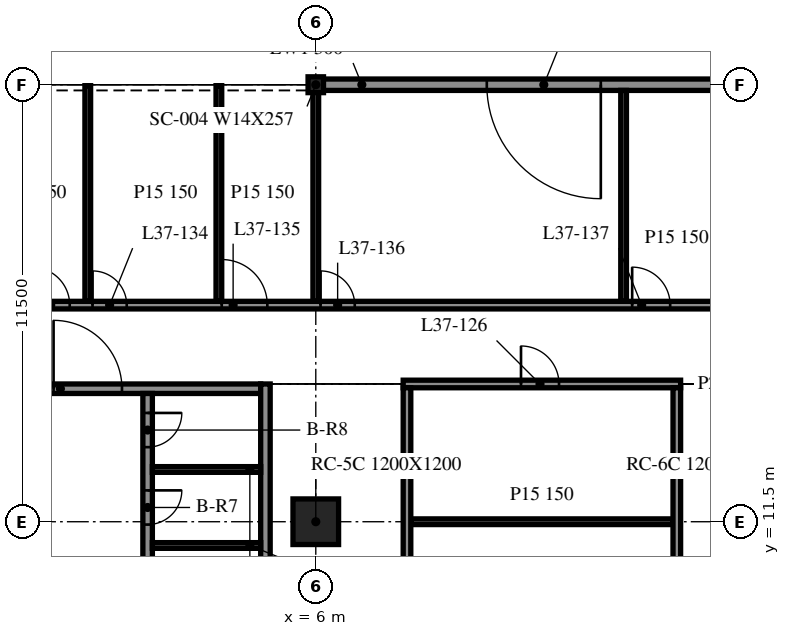
"""IFC4 building model, lengths in metres.
Left out: names, types, materials, properties, quantities, classifications, styles, units other than length and angle.
Written with IfcOpenShell. Run it as: python <this file> out.ifc"""

import sys

from ifc_helpers import new_model, si_unit, direction, frame, frame_2d, origin, origin_2d, place, context, subcontext, project, spatial, rectangle, i_section, extrude, element, fill, save


model = new_model("IFC4")
c1 = context("Model", 3, precision=1e-05, world=origin(), true_north=direction((0.0, 1.0)))
c2 = subcontext(c1, "Body", "Model", "MODEL_VIEW")
j1 = project(units=[si_unit("LENGTHUNIT", "METRE"), si_unit("PLANEANGLEUNIT", "RADIAN")], contexts=[c1])
p1 = place(None, origin())
s1 = spatial("IfcSite", under=j1, at=p1, CompositionType="ELEMENT")
p2 = place(p1, origin())
s2 = spatial("IfcBuilding", under=s1, at=p2, CompositionType="ELEMENT")
p3 = place(p2, frame((0.0, 0.0, 159.2)))
s3 = spatial("IfcBuildingStorey", under=s2, at=p3, CompositionType="ELEMENT", Elevation=159.2)
p4 = place(p3, frame((6.0, 11.5, -0.34), z_axis=(0.0, 0.0, 1.0), x_axis=(1.0, 0.0, 0.0)))
e1 = element("IfcColumn", 1, at=p4, inside=s3, PredefinedType="COLUMN", context=c2, shape_type="SweptSolid", body=[
    extrude(rectangle(XDim=1.2, YDim=1.2, at=origin_2d()), origin(), (0.0, 0.0, 1.0), 3.8),
])
p5 = place(p3, frame((6.0, 23.0, -0.34), z_axis=(0.0, 0.0, 1.0), x_axis=(1.0, 0.0, 0.0)))
e2 = element("IfcColumn", 2, at=p5, inside=s3, PredefinedType="COLUMN", context=c2, shape_type="SweptSolid", body=[
    extrude(i_section(OverallWidth=0.406, OverallDepth=0.417, WebThickness=0.03, FlangeThickness=0.048, at=origin_2d()), origin(), (0.0, 0.0, 1.0), 3.8),
])
p6 = place(p3, frame((17.985, 23.0, 0.0), z_axis=(0.0, 0.0, 1.0), x_axis=(-1.0, 0.0, 0.0)))
e3 = element("IfcWall", 3, at=p6, inside=s3, PredefinedType="NOTDEFINED", context=c2, shape_type="SweptSolid", body=[
    extrude(rectangle(XDim=11.97, YDim=0.3, at=frame_2d((5.985, 0.0))), origin(), (0.0, 0.0, 1.0), 2.782),
])
p7 = place(p6, frame((4.485, 0.0, 0.0)))
e4 = element("IfcOpeningElement", 4, at=p7, cuts=e3, PredefinedType="OPENING", context=c2, shape_type="SweptSolid", body=[
    extrude(rectangle(XDim=3.0, YDim=2.4, at=frame_2d((1.5, 1.2))), frame((0.0, 0.16, 0.0), z_axis=(0.0, -1.0, 0.0), x_axis=(1.0, 0.0, 0.0)), (0.0, 0.0, 1.0), 0.32),
])
p8 = place(p3, frame((4.675, -9.125, 0.0), z_axis=(0.0, 0.0, 1.0), x_axis=(0.0, 1.0, 0.0)))
e5 = element("IfcWall", 5, at=p8, inside=s3, PredefinedType="SOLIDWALL", context=c2, shape_type="SweptSolid", body=[
    extrude(rectangle(XDim=24.25, YDim=0.25, at=frame_2d((12.125, 0.0))), origin(), (0.0, 0.0, 1.0), 3.46),
])
p9 = place(p3, frame((-4.55, 15.0, 0.0), z_axis=(0.0, 0.0, 1.0), x_axis=(1.0, 0.0, 0.0)))
e6 = element("IfcWall", 6, at=p9, inside=s3, PredefinedType="SOLIDWALL", context=c2, shape_type="SweptSolid", body=[
    extrude(rectangle(XDim=9.1, YDim=0.25, at=frame_2d((4.55, 0.0))), origin(), (0.0, 0.0, 1.0), 3.46),
])
p10 = place(p9, frame((3.65, 0.0, 0.0)))
e7 = element("IfcOpeningElement", 7, at=p10, cuts=e6, PredefinedType="OPENING", context=c2, shape_type="SweptSolid", body=[
    extrude(rectangle(XDim=1.8, YDim=2.1, at=frame_2d((0.9, 1.05))), frame((0.0, 0.135, 0.0), z_axis=(0.0, -1.0, 0.0), x_axis=(1.0, 0.0, 0.0)), (0.0, 0.0, 1.0), 0.27),
])
p11 = place(p3, frame((1.575, 14.875, 0.0), z_axis=(0.0, 0.0, 1.0), x_axis=(0.0, -1.0, 0.0)))
e8 = element("IfcWall", 8, at=p11, inside=s3, PredefinedType="SOLIDWALL", context=c2, shape_type="SweptSolid", body=[
    extrude(rectangle(XDim=17.5, YDim=0.25, at=frame_2d((8.75, 0.0))), origin(), (0.0, 0.0, 1.0), 3.46),
])
p12 = place(p11, frame((15.45, 0.0, 0.0)))
e9 = element("IfcOpeningElement", 9, at=p12, cuts=e8, PredefinedType="OPENING", context=c2, shape_type="SweptSolid", body=[
    extrude(rectangle(XDim=1.1, YDim=2.1, at=frame_2d((0.55, 1.05))), frame((0.0, 0.135, 0.0), z_axis=(0.0, -1.0, 0.0), x_axis=(1.0, 0.0, 0.0)), (0.0, 0.0, 1.0), 0.27),
])
p13 = place(p11, frame((12.7, 0.0, 0.0)))
e10 = element("IfcOpeningElement", 10, at=p13, cuts=e8, PredefinedType="OPENING", context=c2, shape_type="SweptSolid", body=[
    extrude(rectangle(XDim=1.1, YDim=2.1, at=frame_2d((0.55, 1.05))), frame((0.0, 0.135, 0.0), z_axis=(0.0, -1.0, 0.0), x_axis=(1.0, 0.0, 0.0)), (0.0, 0.0, 1.0), 0.27),
])
p14 = place(p11, frame((9.95, 0.0, 0.0)))
e11 = element("IfcOpeningElement", 11, at=p14, cuts=e8, PredefinedType="OPENING", context=c2, shape_type="SweptSolid", body=[
    extrude(rectangle(XDim=1.1, YDim=2.1, at=frame_2d((0.55, 1.05))), frame((0.0, 0.135, 0.0), z_axis=(0.0, -1.0, 0.0), x_axis=(1.0, 0.0, 0.0)), (0.0, 0.0, 1.0), 0.27),
])
p15 = place(p11, frame((7.2, 0.0, 0.0)))
e12 = element("IfcOpeningElement", 12, at=p15, cuts=e8, PredefinedType="OPENING", context=c2, shape_type="SweptSolid", body=[
    extrude(rectangle(XDim=1.1, YDim=2.1, at=frame_2d((0.55, 1.05))), frame((0.0, 0.135, 0.0), z_axis=(0.0, -1.0, 0.0), x_axis=(1.0, 0.0, 0.0)), (0.0, 0.0, 1.0), 0.27),
])
p16 = place(p11, frame((4.587, 0.0, 0.0)))
e13 = element("IfcOpeningElement", 13, at=p16, cuts=e8, PredefinedType="OPENING", context=c2, shape_type="SweptSolid", body=[
    extrude(rectangle(XDim=0.9, YDim=2.1, at=frame_2d((0.45, 1.05))), frame((0.0, 0.135, 0.0), z_axis=(0.0, -1.0, 0.0), x_axis=(1.0, 0.0, 0.0)), (0.0, 0.0, 1.0), 0.27),
])
p17 = place(p11, frame((2.55, 0.0, 0.0)))
e14 = element("IfcOpeningElement", 14, at=p17, cuts=e8, PredefinedType="OPENING", context=c2, shape_type="SweptSolid", body=[
    extrude(rectangle(XDim=0.9, YDim=2.1, at=frame_2d((0.45, 1.05))), frame((0.0, 0.135, 0.0), z_axis=(0.0, -1.0, 0.0), x_axis=(1.0, 0.0, 0.0)), (0.0, 0.0, 1.0), 0.27),
])
p18 = place(p11, frame((0.512, 0.0, 0.0)))
e15 = element("IfcOpeningElement", 15, at=p18, cuts=e8, PredefinedType="OPENING", context=c2, shape_type="SweptSolid", body=[
    extrude(rectangle(XDim=0.9, YDim=2.1, at=frame_2d((0.45, 1.05))), frame((0.0, 0.135, 0.0), z_axis=(0.0, -1.0, 0.0), x_axis=(1.0, 0.0, 0.0)), (0.0, 0.0, 1.0), 0.27),
])
for number, where, z_axis, x_axis in (
    (16, (1.7, 10.875, 0.0), (0.0, 0.0, 1.0), (1.0, 0.0, 0.0)),
    (17, (1.7, 12.875, 0.0), (0.0, 0.0, 1.0), (1.0, 0.0, 0.0)),
):
    element("IfcWall", number, at=place(p3, frame(where, z_axis=z_axis, x_axis=x_axis)), inside=s3, PredefinedType="PARTITIONING", context=c2, shape_type="SweptSolid", body=[
        extrude(rectangle(XDim=2.85, YDim=0.15, at=frame_2d((1.425, 0.0))), origin(), (0.0, 0.0, 1.0), 3.46),
    ])
p19 = place(p3, frame((8.5, 11.5, 0.0), z_axis=(0.0, 0.0, 1.0), x_axis=(1.0, 0.0, 0.0)))
e18 = element("IfcWall", 18, at=p19, inside=s3, PredefinedType="PARTITIONING", context=c2, shape_type="SweptSolid", body=[
    extrude(rectangle(XDim=6.9, YDim=0.15, at=frame_2d((3.45, 0.0))), origin(), (0.0, 0.0, 1.0), 3.46),
])
p20 = place(p3, frame((8.3, 15.125, 0.0), z_axis=(0.0, 0.0, 1.0), x_axis=(1.0, 0.0, 0.0)))
e19 = element("IfcWall", 19, at=p20, inside=s3, PredefinedType="PARTITIONING", context=c2, shape_type="SweptSolid", body=[
    extrude(rectangle(XDim=7.3, YDim=0.2, at=frame_2d((3.65, 0.0))), origin(), (0.0, 0.0, 1.0), 3.46),
])
p21 = place(p20, frame((3.1, 0.0, 0.0)))
e20 = element("IfcOpeningElement", 20, at=p21, cuts=e19, PredefinedType="OPENING", context=c2, shape_type="SweptSolid", body=[
    extrude(rectangle(XDim=1.0, YDim=2.1, at=frame_2d((0.5, 1.05))), frame((0.0, 0.11, 0.0), z_axis=(0.0, -1.0, 0.0), x_axis=(1.0, 0.0, 0.0)), (0.0, 0.0, 1.0), 0.22),
])
p22 = place(p3, frame((-47.975, 17.2, 0.0), z_axis=(0.0, 0.0, 1.0), x_axis=(1.0, 0.0, 0.0)))
e21 = element("IfcWall", 21, at=p22, inside=s3, PredefinedType="PARTITIONING", context=c2, shape_type="SweptSolid", body=[
    extrude(rectangle(XDim=95.95, YDim=0.2, at=frame_2d((47.975, 0.0))), origin(), (0.0, 0.0, 1.0), 3.46),
])
p23 = place(p22, frame((4.5, 0.0, 0.0)))
e22 = element("IfcOpeningElement", 22, at=p23, cuts=e21, PredefinedType="OPENING", context=c2, shape_type="SweptSolid", body=[
    extrude(rectangle(XDim=1.0, YDim=2.1, at=frame_2d((0.5, 1.05))), frame((0.0, 0.11, 0.0), z_axis=(0.0, -1.0, 0.0), x_axis=(1.0, 0.0, 0.0)), (0.0, 0.0, 1.0), 0.22),
])
p24 = place(p22, frame((10.5, 0.0, 0.0)))
e23 = element("IfcOpeningElement", 23, at=p24, cuts=e21, PredefinedType="OPENING", context=c2, shape_type="SweptSolid", body=[
    extrude(rectangle(XDim=1.0, YDim=2.1, at=frame_2d((0.5, 1.05))), frame((0.0, 0.11, 0.0), z_axis=(0.0, -1.0, 0.0), x_axis=(1.0, 0.0, 0.0)), (0.0, 0.0, 1.0), 0.22),
])
p25 = place(p22, frame((22.7, 0.0, 0.0)))
e24 = element("IfcOpeningElement", 24, at=p25, cuts=e21, PredefinedType="OPENING", context=c2, shape_type="SweptSolid", body=[
    extrude(rectangle(XDim=0.9, YDim=2.1, at=frame_2d((0.45, 1.05))), frame((0.0, 0.11, 0.0), z_axis=(0.0, -1.0, 0.0), x_axis=(1.0, 0.0, 0.0)), (0.0, 0.0, 1.0), 0.22),
])
p26 = place(p22, frame((25.7, 0.0, 0.0)))
e25 = element("IfcOpeningElement", 25, at=p26, cuts=e21, PredefinedType="OPENING", context=c2, shape_type="SweptSolid", body=[
    extrude(rectangle(XDim=1.2, YDim=2.1, at=frame_2d((0.6, 1.05))), frame((0.0, 0.11, 0.0), z_axis=(0.0, -1.0, 0.0), x_axis=(1.0, 0.0, 0.0)), (0.0, 0.0, 1.0), 0.22),
])
p27 = place(p22, frame((28.7, 0.0, 0.0)))
e26 = element("IfcOpeningElement", 26, at=p27, cuts=e21, PredefinedType="OPENING", context=c2, shape_type="SweptSolid", body=[
    extrude(rectangle(XDim=0.9, YDim=2.1, at=frame_2d((0.45, 1.05))), frame((0.0, 0.11, 0.0), z_axis=(0.0, -1.0, 0.0), x_axis=(1.0, 0.0, 0.0)), (0.0, 0.0, 1.0), 0.22),
])
p28 = place(p22, frame((36.7, 0.0, 0.0)))
e27 = element("IfcOpeningElement", 27, at=p28, cuts=e21, PredefinedType="OPENING", context=c2, shape_type="SweptSolid", body=[
    extrude(rectangle(XDim=1.0, YDim=2.1, at=frame_2d((0.5, 1.05))), frame((0.0, 0.11, 0.0), z_axis=(0.0, -1.0, 0.0), x_axis=(1.0, 0.0, 0.0)), (0.0, 0.0, 1.0), 0.22),
])
p29 = place(p22, frame((46.5, 0.0, 0.0)))
e28 = element("IfcOpeningElement", 28, at=p29, cuts=e21, PredefinedType="OPENING", context=c2, shape_type="SweptSolid", body=[
    extrude(rectangle(XDim=1.0, YDim=2.1, at=frame_2d((0.5, 1.05))), frame((0.0, 0.11, 0.0), z_axis=(0.0, -1.0, 0.0), x_axis=(1.0, 0.0, 0.0)), (0.0, 0.0, 1.0), 0.22),
])
p30 = place(p22, frame((48.1, 0.0, 0.0)))
e29 = element("IfcOpeningElement", 29, at=p30, cuts=e21, PredefinedType="OPENING", context=c2, shape_type="SweptSolid", body=[
    extrude(rectangle(XDim=0.9, YDim=2.1, at=frame_2d((0.45, 1.05))), frame((0.0, 0.11, 0.0), z_axis=(0.0, -1.0, 0.0), x_axis=(1.0, 0.0, 0.0)), (0.0, 0.0, 1.0), 0.22),
])
p31 = place(p22, frame((51.5, 0.0, 0.0)))
e30 = element("IfcOpeningElement", 30, at=p31, cuts=e21, PredefinedType="OPENING", context=c2, shape_type="SweptSolid", body=[
    extrude(rectangle(XDim=1.2, YDim=2.1, at=frame_2d((0.6, 1.05))), frame((0.0, 0.11, 0.0), z_axis=(0.0, -1.0, 0.0), x_axis=(1.0, 0.0, 0.0)), (0.0, 0.0, 1.0), 0.22),
])
p32 = place(p22, frame((54.1, 0.0, 0.0)))
e31 = element("IfcOpeningElement", 31, at=p32, cuts=e21, PredefinedType="OPENING", context=c2, shape_type="SweptSolid", body=[
    extrude(rectangle(XDim=0.9, YDim=2.1, at=frame_2d((0.45, 1.05))), frame((0.0, 0.11, 0.0), z_axis=(0.0, -1.0, 0.0), x_axis=(1.0, 0.0, 0.0)), (0.0, 0.0, 1.0), 0.22),
])
p33 = place(p22, frame((62.3, 0.0, 0.0)))
e32 = element("IfcOpeningElement", 32, at=p33, cuts=e21, PredefinedType="OPENING", context=c2, shape_type="SweptSolid", body=[
    extrude(rectangle(XDim=1.0, YDim=2.1, at=frame_2d((0.5, 1.05))), frame((0.0, 0.11, 0.0), z_axis=(0.0, -1.0, 0.0), x_axis=(1.0, 0.0, 0.0)), (0.0, 0.0, 1.0), 0.22),
])
p34 = place(p22, frame((74.3, 0.0, 0.0)))
e33 = element("IfcOpeningElement", 33, at=p34, cuts=e21, PredefinedType="OPENING", context=c2, shape_type="SweptSolid", body=[
    extrude(rectangle(XDim=1.0, YDim=2.1, at=frame_2d((0.5, 1.05))), frame((0.0, 0.11, 0.0), z_axis=(0.0, -1.0, 0.0), x_axis=(1.0, 0.0, 0.0)), (0.0, 0.0, 1.0), 0.22),
])
p35 = place(p22, frame((78.1, 0.0, 0.0)))
e34 = element("IfcOpeningElement", 34, at=p35, cuts=e21, PredefinedType="OPENING", context=c2, shape_type="SweptSolid", body=[
    extrude(rectangle(XDim=0.9, YDim=2.1, at=frame_2d((0.45, 1.05))), frame((0.0, 0.11, 0.0), z_axis=(0.0, -1.0, 0.0), x_axis=(1.0, 0.0, 0.0)), (0.0, 0.0, 1.0), 0.22),
])
p36 = place(p22, frame((84.1, 0.0, 0.0)))
e35 = element("IfcOpeningElement", 35, at=p36, cuts=e21, PredefinedType="OPENING", context=c2, shape_type="SweptSolid", body=[
    extrude(rectangle(XDim=1.2, YDim=2.1, at=frame_2d((0.6, 1.05))), frame((0.0, 0.11, 0.0), z_axis=(0.0, -1.0, 0.0), x_axis=(1.0, 0.0, 0.0)), (0.0, 0.0, 1.0), 0.22),
])
for number, where, z_axis, x_axis in (
    (36, (0.0, 17.3, 0.0), (0.0, 0.0, 1.0), (0.0, 1.0, 0.0)),
    (37, (3.45, 17.3, 0.0), (0.0, 0.0, 1.0), (0.0, 1.0, 0.0)),
    (38, (6.0, 17.3, 0.0), (0.0, 0.0, 1.0), (0.0, 1.0, 0.0)),
):
    element("IfcWall", number, at=place(p3, frame(where, z_axis=z_axis, x_axis=x_axis)), inside=s3, PredefinedType="PARTITIONING", context=c2, shape_type="SweptSolid", body=[
        extrude(rectangle(XDim=5.675, YDim=0.15, at=frame_2d((2.837, 0.0))), origin(), (0.0, 0.0, 1.0), 3.46),
    ])
p37 = place(p3, frame((8.4, -9.025, 0.0), z_axis=(0.0, 0.0, 1.0), x_axis=(0.0, 1.0, 0.0)))
e39 = element("IfcWall", 39, at=p37, inside=s3, PredefinedType="PARTITIONING", context=c2, shape_type="SweptSolid", body=[
    extrude(rectangle(XDim=24.05, YDim=0.2, at=frame_2d((12.025, 0.0))), origin(), (0.0, 0.0, 1.0), 3.46),
])
p38 = place(p37, frame((11.5, 0.0, 0.0)))
e40 = element("IfcOpeningElement", 40, at=p38, cuts=e39, PredefinedType="OPENING", context=c2, shape_type="SweptSolid", body=[
    extrude(rectangle(XDim=0.9, YDim=2.1, at=frame_2d((0.45, 1.05))), frame((0.0, 0.11, 0.0), z_axis=(0.0, -1.0, 0.0), x_axis=(1.0, 0.0, 0.0)), (0.0, 0.0, 1.0), 0.22),
])
p39 = place(p3, frame((14.1, 17.3, 0.0), z_axis=(0.0, 0.0, 1.0), x_axis=(0.0, 1.0, 0.0)))
e41 = element("IfcWall", 41, at=p39, inside=s3, PredefinedType="PARTITIONING", context=c2, shape_type="SweptSolid", body=[
    extrude(rectangle(XDim=5.55, YDim=0.15, at=frame_2d((2.775, 0.0))), origin(), (0.0, 0.0, 1.0), 3.46),
])
p40 = place(p3, frame((15.5, -9.025, 0.0), z_axis=(0.0, 0.0, 1.0), x_axis=(0.0, 1.0, 0.0)))
e42 = element("IfcWall", 42, at=p40, inside=s3, PredefinedType="PARTITIONING", context=c2, shape_type="SweptSolid", body=[
    extrude(rectangle(XDim=24.05, YDim=0.2, at=frame_2d((12.025, 0.0))), origin(), (0.0, 0.0, 1.0), 3.46),
])
p41 = place(p7, origin())
e43 = element("IfcDoor", 43, at=p41, inside=s3, OperationType="SINGLE_SWING_LEFT", PredefinedType="DOOR", context=c2, shape_type="SweptSolid", body=[
    extrude(rectangle(XDim=3.0, YDim=2.4, at=frame_2d((1.5, 1.2))), frame((0.0, 0.025, 0.0), z_axis=(0.0, -1.0, 0.0), x_axis=(1.0, 0.0, 0.0)), (0.0, 0.0, 1.0), 0.05),
])
fill(e4, e43)
p42 = place(p10, origin())
e44 = element("IfcDoor", 44, at=p42, inside=s3, OperationType="DOUBLE_DOOR_SINGLE_SWING", PredefinedType="DOOR", context=c2, shape_type="SweptSolid", body=[
    extrude(rectangle(XDim=1.8, YDim=2.1, at=frame_2d((0.9, 1.05))), frame((0.0, 0.025, 0.0), z_axis=(0.0, -1.0, 0.0), x_axis=(1.0, 0.0, 0.0)), (0.0, 0.0, 1.0), 0.05),
])
fill(e7, e44)
p43 = place(p17, origin())
e45 = element("IfcDoor", 45, at=p43, inside=s3, OperationType="SINGLE_SWING_LEFT", PredefinedType="DOOR", context=c2, shape_type="SweptSolid", body=[
    extrude(rectangle(XDim=0.9, YDim=2.1, at=frame_2d((0.45, 1.05))), frame((0.0, 0.025, 0.0), z_axis=(0.0, -1.0, 0.0), x_axis=(1.0, 0.0, 0.0)), (0.0, 0.0, 1.0), 0.05),
])
fill(e14, e45)
p44 = place(p18, origin())
e46 = element("IfcDoor", 46, at=p44, inside=s3, OperationType="SINGLE_SWING_RIGHT", PredefinedType="DOOR", context=c2, shape_type="SweptSolid", body=[
    extrude(rectangle(XDim=0.9, YDim=2.1, at=frame_2d((0.45, 1.05))), frame((0.0, 0.025, 0.0), z_axis=(0.0, -1.0, 0.0), x_axis=(1.0, 0.0, 0.0)), (0.0, 0.0, 1.0), 0.05),
])
fill(e15, e46)
p45 = place(p21, origin())
e47 = element("IfcDoor", 47, at=p45, inside=s3, OperationType="SINGLE_SWING_RIGHT", PredefinedType="DOOR", context=c2, shape_type="SweptSolid", body=[
    extrude(rectangle(XDim=1.0, YDim=2.1, at=frame_2d((0.5, 1.05))), frame((0.0, 0.025, 0.0), z_axis=(0.0, -1.0, 0.0), x_axis=(1.0, 0.0, 0.0)), (0.0, 0.0, 1.0), 0.05),
])
fill(e20, e47)
p46 = place(p29, origin())
e48 = element("IfcDoor", 48, at=p46, inside=s3, OperationType="SINGLE_SWING_LEFT", PredefinedType="DOOR", context=c2, shape_type="SweptSolid", body=[
    extrude(rectangle(XDim=1.0, YDim=2.1, at=frame_2d((0.5, 1.05))), frame((0.0, 0.025, 0.0), z_axis=(0.0, -1.0, 0.0), x_axis=(1.0, 0.0, 0.0)), (0.0, 0.0, 1.0), 0.05),
])
fill(e28, e48)
p47 = place(p30, origin())
e49 = element("IfcDoor", 49, at=p47, inside=s3, OperationType="SINGLE_SWING_RIGHT", PredefinedType="DOOR", context=c2, shape_type="SweptSolid", body=[
    extrude(rectangle(XDim=0.9, YDim=2.1, at=frame_2d((0.45, 1.05))), frame((0.0, 0.025, 0.0), z_axis=(0.0, -1.0, 0.0), x_axis=(1.0, 0.0, 0.0)), (0.0, 0.0, 1.0), 0.05),
])
fill(e29, e49)
p48 = place(p31, origin())
e50 = element("IfcDoor", 50, at=p48, inside=s3, OperationType="SINGLE_SWING_RIGHT", PredefinedType="DOOR", context=c2, shape_type="SweptSolid", body=[
    extrude(rectangle(XDim=1.2, YDim=2.1, at=frame_2d((0.6, 1.05))), frame((0.0, 0.025, 0.0), z_axis=(0.0, -1.0, 0.0), x_axis=(1.0, 0.0, 0.0)), (0.0, 0.0, 1.0), 0.05),
])
fill(e30, e50)
p49 = place(p32, origin())
e51 = element("IfcDoor", 51, at=p49, inside=s3, OperationType="SINGLE_SWING_RIGHT", PredefinedType="DOOR", context=c2, shape_type="SweptSolid", body=[
    extrude(rectangle(XDim=0.9, YDim=2.1, at=frame_2d((0.45, 1.05))), frame((0.0, 0.025, 0.0), z_axis=(0.0, -1.0, 0.0), x_axis=(1.0, 0.0, 0.0)), (0.0, 0.0, 1.0), 0.05),
])
fill(e31, e51)
p50 = place(p33, origin())
e52 = element("IfcDoor", 52, at=p50, inside=s3, OperationType="SINGLE_SWING_RIGHT", PredefinedType="DOOR", context=c2, shape_type="SweptSolid", body=[
    extrude(rectangle(XDim=1.0, YDim=2.1, at=frame_2d((0.5, 1.05))), frame((0.0, 0.025, 0.0), z_axis=(0.0, -1.0, 0.0), x_axis=(1.0, 0.0, 0.0)), (0.0, 0.0, 1.0), 0.05),
])
fill(e32, e52)
save(model, sys.argv[1])
